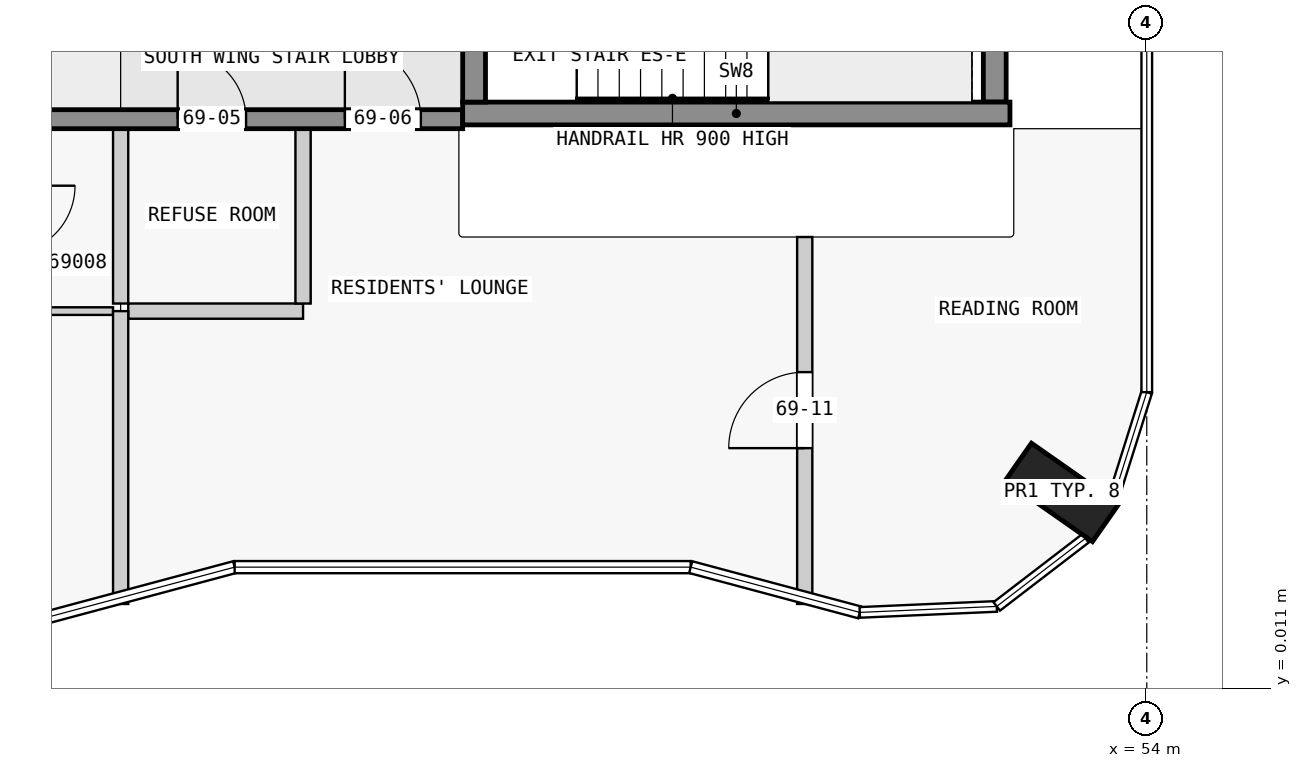
"""IFC4 building model, lengths in metres.
Left out: names, types, materials, properties, quantities, classifications, styles, units other than length and angle.
Written with IfcOpenShell. Run it as: python <this file> out.ifc"""

import sys

from ifc_helpers import new_model, si_unit, direction, frame, frame_2d, origin, origin_2d, place, context, subcontext, project, spatial, rectangle, extrude, element, fill, save


model = new_model("IFC4")
c1 = context("Model", 3, precision=1e-05, world=origin(), true_north=direction((0.0, 1.0)))
c2 = subcontext(c1, "Body", "Model", "MODEL_VIEW")
j1 = project(units=[si_unit("LENGTHUNIT", "METRE"), si_unit("PLANEANGLEUNIT", "RADIAN")], contexts=[c1])
p1 = place(None, origin())
s1 = spatial("IfcSite", under=j1, at=p1, CompositionType="ELEMENT")
p2 = place(p1, origin())
s2 = spatial("IfcBuilding", under=s1, at=p2, CompositionType="ELEMENT")
p3 = place(p2, frame((0.0, 0.0, 263.4)))
s3 = spatial("IfcBuildingStorey", under=s2, at=p3, CompositionType="ELEMENT", Elevation=263.4)
p4 = place(p3, frame((52.884, 2.59, 0.0), z_axis=(0.0, 0.0, 1.0), x_axis=(0.573542637991, 0.819175709117, 0.0)))
e1 = element("IfcColumn", 1, at=p4, inside=s3, PredefinedType="COLUMN", context=c2, shape_type="SweptSolid", body=[
    extrude(rectangle(XDim=0.6, YDim=1.4, at=origin_2d()), origin(), (0.0, 0.0, 1.0), 3.5),
])
p5 = place(p3, frame((45.15, 7.725, 0.0), z_axis=(0.0, 0.0, 1.0), x_axis=(0.0, 1.0, 0.0)))
e2 = element("IfcWall", 2, at=p5, inside=s3, PredefinedType="SHEAR", context=c2, shape_type="SweptSolid", body=[
    extrude(rectangle(XDim=2.55, YDim=0.3, at=frame_2d((1.275, 0.0))), origin(), (0.0, 0.0, 1.0), 3.5),
])
p6 = place(p5, frame((0.725, 0.0, 0.0)))
e3 = element("IfcOpeningElement", 3, at=p6, cuts=e2, PredefinedType="OPENING", context=c2, shape_type="SweptSolid", body=[
    extrude(rectangle(XDim=1.1, YDim=2.1, at=frame_2d((0.55, 1.05))), frame((0.0, 0.16, 0.0), z_axis=(0.0, -1.0, 0.0), x_axis=(1.0, 0.0, 0.0)), (0.0, 0.0, 1.0), 0.32),
])
p7 = place(p3, frame((52.0, 7.725, 0.0), z_axis=(0.0, 0.0, 1.0), x_axis=(0.0, 1.0, 0.0)))
e4 = element("IfcWall", 4, at=p7, inside=s3, PredefinedType="SHEAR", context=c2, shape_type="SweptSolid", body=[
    extrude(rectangle(XDim=2.55, YDim=0.3, at=frame_2d((1.275, 0.0))), origin(), (0.0, 0.0, 1.0), 3.5),
])
p8 = place(p3, frame((45.0, 7.575, 0.0), z_axis=(0.0, 0.0, 1.0), x_axis=(1.0, 0.0, 0.0)))
e5 = element("IfcWall", 5, at=p8, inside=s3, PredefinedType="SHEAR", context=c2, shape_type="SweptSolid", body=[
    extrude(rectangle(XDim=7.2, YDim=0.3, at=frame_2d((3.6, 0.0))), origin(), (0.0, 0.0, 1.0), 3.5),
])
p9 = place(p3, frame((22.5, 7.5, 0.0), z_axis=(0.0, 0.0, 1.0), x_axis=(1.0, 0.0, 0.0)))
e6 = element("IfcWall", 6, at=p9, inside=s3, PredefinedType="SHEAR", context=c2, shape_type="SweptSolid", body=[
    extrude(rectangle(XDim=22.5, YDim=0.25, at=frame_2d((11.25, 0.0))), origin(), (0.0, 0.0, 1.0), 3.25),
])
p10 = place(p9, frame((1.75, 0.0, 0.0)))
e7 = element("IfcOpeningElement", 7, at=p10, cuts=e6, PredefinedType="OPENING", context=c2, shape_type="SweptSolid", body=[
    extrude(rectangle(XDim=1.0, YDim=2.1, at=frame_2d((0.5, 1.05))), frame((0.0, 0.135, 0.0), z_axis=(0.0, -1.0, 0.0), x_axis=(1.0, 0.0, 0.0)), (0.0, 0.0, 1.0), 0.27),
])
p11 = place(p9, frame((6.25, 0.0, 0.0)))
e8 = element("IfcOpeningElement", 8, at=p11, cuts=e6, PredefinedType="OPENING", context=c2, shape_type="SweptSolid", body=[
    extrude(rectangle(XDim=1.0, YDim=2.1, at=frame_2d((0.5, 1.05))), frame((0.0, 0.135, 0.0), z_axis=(0.0, -1.0, 0.0), x_axis=(1.0, 0.0, 0.0)), (0.0, 0.0, 1.0), 0.27),
])
p12 = place(p9, frame((10.35, 0.0, 0.0)))
e9 = element("IfcOpeningElement", 9, at=p12, cuts=e6, PredefinedType="OPENING", context=c2, shape_type="SweptSolid", body=[
    extrude(rectangle(XDim=1.8, YDim=2.1, at=frame_2d((0.9, 1.05))), frame((0.0, 0.135, 0.0), z_axis=(0.0, -1.0, 0.0), x_axis=(1.0, 0.0, 0.0)), (0.0, 0.0, 1.0), 0.27),
])
p13 = place(p9, frame((15.25, 0.0, 0.0)))
e10 = element("IfcOpeningElement", 10, at=p13, cuts=e6, PredefinedType="OPENING", context=c2, shape_type="SweptSolid", body=[
    extrude(rectangle(XDim=1.0, YDim=2.1, at=frame_2d((0.5, 1.05))), frame((0.0, 0.135, 0.0), z_axis=(0.0, -1.0, 0.0), x_axis=(1.0, 0.0, 0.0)), (0.0, 0.0, 1.0), 0.27),
])
p14 = place(p9, frame((18.75, 0.0, 0.0)))
e11 = element("IfcOpeningElement", 11, at=p14, cuts=e6, PredefinedType="OPENING", context=c2, shape_type="SweptSolid", body=[
    extrude(rectangle(XDim=0.9, YDim=2.1, at=frame_2d((0.45, 1.05))), frame((0.0, 0.135, 0.0), z_axis=(0.0, -1.0, 0.0), x_axis=(1.0, 0.0, 0.0)), (0.0, 0.0, 1.0), 0.27),
])
p15 = place(p9, frame((20.95, 0.0, 0.0)))
e12 = element("IfcOpeningElement", 12, at=p15, cuts=e6, PredefinedType="OPENING", context=c2, shape_type="SweptSolid", body=[
    extrude(rectangle(XDim=1.0, YDim=2.1, at=frame_2d((0.5, 1.05))), frame((0.0, 0.135, 0.0), z_axis=(0.0, -1.0, 0.0), x_axis=(1.0, 0.0, 0.0)), (0.0, 0.0, 1.0), 0.27),
])
p16 = place(p3, frame((39.05, 4.975, 0.0), z_axis=(0.0, 0.0, 1.0), x_axis=(1.0, 0.0, 0.0)))
e13 = element("IfcWall", 13, at=p16, inside=s3, PredefinedType="PARTITIONING", context=c2, shape_type="SweptSolid", body=[
    extrude(rectangle(XDim=1.35, YDim=0.1, at=frame_2d((0.675, 0.0))), origin(), (0.0, 0.0, 1.0), 3.25),
])
p17 = place(p3, frame((40.6, 4.975, 0.0), z_axis=(0.0, 0.0, 1.0), x_axis=(1.0, 0.0, 0.0)))
e14 = element("IfcWall", 14, at=p17, inside=s3, PredefinedType="PARTITIONING", context=c2, shape_type="SweptSolid", body=[
    extrude(rectangle(XDim=2.3, YDim=0.2, at=frame_2d((1.15, 0.0))), origin(), (0.0, 0.0, 1.0), 3.25),
])
p18 = place(p3, frame((40.5, 4.975, 0.0), z_axis=(0.0, 0.0, 1.0), x_axis=(0.0, -1.0, 0.0)))
e15 = element("IfcWall", 15, at=p18, inside=s3, PredefinedType="PARTITIONING", context=c2, shape_type="SweptSolid", body=[
    extrude(rectangle(XDim=3.853, YDim=0.2, at=frame_2d((1.926, 0.0))), origin(), (0.0, 0.0, 1.0), 3.25),
])
for number, where, z_axis, x_axis in (
    (16, (40.5, 5.075, 0.0), (0.0, 0.0, 1.0), (0.0, 1.0, 0.0)),
    (17, (42.9, 5.075, 0.0), (0.0, 0.0, 1.0), (0.0, 1.0, 0.0)),
):
    element("IfcWall", number, at=place(p3, frame(where, z_axis=z_axis, x_axis=x_axis)), inside=s3, PredefinedType="PARTITIONING", context=c2, shape_type="SweptSolid", body=[
        extrude(rectangle(XDim=2.3, YDim=0.2, at=frame_2d((1.15, 0.0))), origin(), (0.0, 0.0, 1.0), 3.25),
    ])
p19 = place(p3, frame((49.5, 1.122, 0.0), z_axis=(0.0, 0.0, 1.0), x_axis=(0.0, 1.0, 0.0)))
e18 = element("IfcWall", 18, at=p19, inside=s3, PredefinedType="PARTITIONING", context=c2, shape_type="SweptSolid", body=[
    extrude(rectangle(XDim=4.828, YDim=0.2, at=frame_2d((2.414, 0.0))), origin(), (0.0, 0.0, 1.0), 3.25),
])
p20 = place(p19, frame((2.05, 0.0, 0.0)))
e19 = element("IfcOpeningElement", 19, at=p20, cuts=e18, PredefinedType="OPENING", context=c2, shape_type="SweptSolid", body=[
    extrude(rectangle(XDim=1.0, YDim=2.1, at=frame_2d((0.5, 1.05))), frame((0.0, 0.11, 0.0), z_axis=(0.0, -1.0, 0.0), x_axis=(1.0, 0.0, 0.0)), (0.0, 0.0, 1.0), 0.22),
])
p21 = place(p14, origin())
e20 = element("IfcDoor", 20, at=p21, inside=s3, OperationType="SINGLE_SWING_RIGHT", PredefinedType="DOOR", context=c2, shape_type="SweptSolid", body=[
    extrude(rectangle(XDim=0.9, YDim=2.1, at=frame_2d((0.45, 1.05))), frame((0.0, 0.025, 0.0), z_axis=(0.0, -1.0, 0.0), x_axis=(1.0, 0.0, 0.0)), (0.0, 0.0, 1.0), 0.05),
])
fill(e11, e20)
p22 = place(p15, origin())
e21 = element("IfcDoor", 21, at=p22, inside=s3, OperationType="SINGLE_SWING_RIGHT", PredefinedType="DOOR", context=c2, shape_type="SweptSolid", body=[
    extrude(rectangle(XDim=1.0, YDim=2.1, at=frame_2d((0.5, 1.05))), frame((0.0, 0.025, 0.0), z_axis=(0.0, -1.0, 0.0), x_axis=(1.0, 0.0, 0.0)), (0.0, 0.0, 1.0), 0.05),
])
fill(e12, e21)
p23 = place(p20, origin())
e22 = element("IfcDoor", 22, at=p23, inside=s3, OperationType="SINGLE_SWING_RIGHT", PredefinedType="DOOR", context=c2, shape_type="SweptSolid", body=[
    extrude(rectangle(XDim=1.0, YDim=2.1, at=frame_2d((0.5, 1.05))), frame((0.0, 0.025, 0.0), z_axis=(0.0, -1.0, 0.0), x_axis=(1.0, 0.0, 0.0)), (0.0, 0.0, 1.0), 0.05),
])
fill(e19, e22)
save(model, sys.argv[1])
